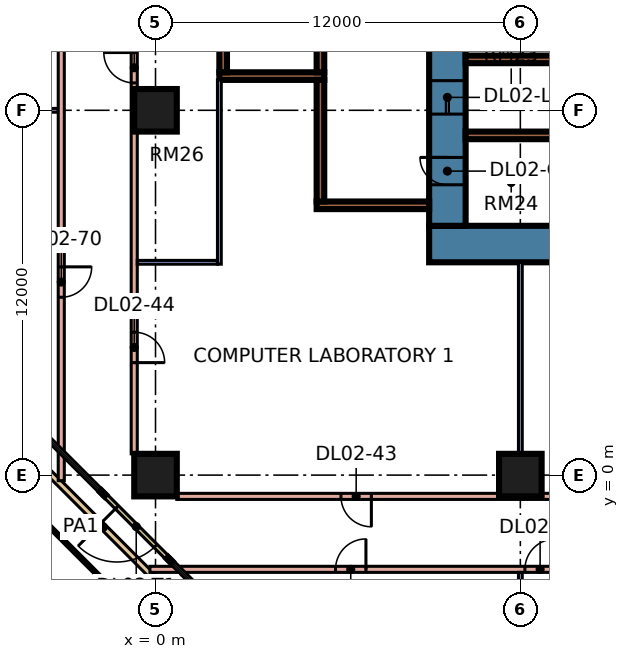
"""IFC4 building model, lengths in metres.
Left out: names, types, materials, properties, quantities, classifications, styles, units other than length and angle.
Written with IfcOpenShell. Run it as: python <this file> out.ifc"""

import sys

from ifc_helpers import new_model, si_unit, direction, frame, frame_2d, origin, origin_2d, place, context, subcontext, project, spatial, rectangle, extrude, element, fill, save


model = new_model("IFC4")
c1 = context("Model", 3, precision=1e-05, world=origin(), true_north=direction((0.0, 1.0)))
c2 = subcontext(c1, "Body", "Model", "MODEL_VIEW")
j1 = project(units=[si_unit("LENGTHUNIT", "METRE"), si_unit("PLANEANGLEUNIT", "RADIAN")], contexts=[c1])
p1 = place(None, origin())
s1 = spatial("IfcSite", under=j1, at=p1, CompositionType="ELEMENT")
p2 = place(p1, origin())
s2 = spatial("IfcBuilding", under=s1, at=p2, CompositionType="ELEMENT")
p3 = place(p2, frame((0.0, 0.0, 12.0)))
s3 = spatial("IfcBuildingStorey", under=s2, at=p3, CompositionType="ELEMENT", Elevation=12.0)
for number, where, z_axis, x_axis in (
    (1, (0.0, 0.0, 0.0), (0.0, 0.0, 1.0), (1.0, 0.0, 0.0)),
    (2, (12.0, 0.0, 0.0), (0.0, 0.0, 1.0), (1.0, 0.0, 0.0)),
    (3, (0.0, 12.0, 0.0), (0.0, 0.0, 1.0), (1.0, 0.0, 0.0)),
):
    element("IfcColumn", number, at=place(p3, frame(where, z_axis=z_axis, x_axis=x_axis)), inside=s3, PredefinedType="COLUMN", context=c2, shape_type="SweptSolid", body=[
        extrude(rectangle(XDim=1.4, YDim=1.4, at=origin_2d()), origin(), (0.0, 0.0, 1.0), 4.8),
    ])
p4 = place(p3, frame((9.0, 7.6, 0.0), z_axis=(0.0, 0.0, 1.0), x_axis=(1.0, 0.0, 0.0)))
e4 = element("IfcWall", 4, at=p4, inside=s3, PredefinedType="SHEAR", context=c2, shape_type="SweptSolid", body=[
    extrude(rectangle(XDim=25.0, YDim=1.2, at=frame_2d((12.5, 0.0))), origin(), (0.0, 0.0, 1.0), 4.8),
])
p5 = place(p3, frame((9.6, 8.2, 0.0), z_axis=(0.0, 0.0, 1.0), x_axis=(0.0, 1.0, 0.0)))
e5 = element("IfcWall", 5, at=p5, inside=s3, PredefinedType="SHEAR", context=c2, shape_type="SweptSolid", body=[
    extrude(rectangle(XDim=10.6, YDim=1.2, at=frame_2d((5.3, 0.0))), origin(), (0.0, 0.0, 1.0), 4.8),
])
p6 = place(p5, frame((3.675, 0.0, 0.0)))
e6 = element("IfcOpeningElement", 6, at=p6, cuts=e5, PredefinedType="OPENING", context=c2, shape_type="SweptSolid", body=[
    extrude(rectangle(XDim=1.1, YDim=2.2, at=frame_2d((0.55, 1.1))), frame((0.0, 0.61, 0.0), z_axis=(0.0, -1.0, 0.0), x_axis=(1.0, 0.0, 0.0)), (0.0, 0.0, 1.0), 1.22),
])
p7 = place(p5, frame((6.175, 0.0, 0.0)))
e7 = element("IfcOpeningElement", 7, at=p7, cuts=e5, PredefinedType="OPENING", context=c2, shape_type="SweptSolid", body=[
    extrude(rectangle(XDim=1.1, YDim=2.2, at=frame_2d((0.55, 1.1))), frame((0.0, 0.61, 0.0), z_axis=(0.0, -1.0, 0.0), x_axis=(1.0, 0.0, 0.0)), (0.0, 0.0, 1.0), 1.22),
])
p8 = place(p5, frame((8.8, 0.0, 0.0)))
e8 = element("IfcOpeningElement", 8, at=p8, cuts=e5, PredefinedType="OPENING", context=c2, shape_type="SweptSolid", body=[
    extrude(rectangle(XDim=1.1, YDim=2.2, at=frame_2d((0.55, 1.1))), frame((0.0, 0.61, 0.0), z_axis=(0.0, -1.0, 0.0), x_axis=(1.0, 0.0, 0.0)), (0.0, 0.0, 1.0), 1.22),
])
p9 = place(p5, frame((1.35, 0.0, 0.0)))
e9 = element("IfcOpeningElement", 9, at=p9, cuts=e5, PredefinedType="OPENING", context=c2, shape_type="SweptSolid", body=[
    extrude(rectangle(XDim=0.9, YDim=2.1, at=frame_2d((0.45, 1.05))), frame((0.0, 0.61, 0.0), z_axis=(0.0, -1.0, 0.0), x_axis=(1.0, 0.0, 0.0)), (0.0, 0.0, 1.0), 1.22),
])
for number, where, z_axis, x_axis in (
    (10, (10.2, 11.175, 0.0), (0.0, 0.0, 1.0), (1.0, 0.0, 0.0)),
    (11, (10.2, 13.675, 0.0), (0.0, 0.0, 1.0), (1.0, 0.0, 0.0)),
):
    element("IfcWall", number, at=place(p3, frame(where, z_axis=z_axis, x_axis=x_axis)), inside=s3, PredefinedType="SHEAR", context=c2, shape_type="SweptSolid", body=[
        extrude(rectangle(XDim=3.0, YDim=0.25, at=frame_2d((1.5, 0.0))), origin(), (0.0, 0.0, 1.0), 4.8),
    ])
p10 = place(p3, frame((2.1, 13.125, 0.0), z_axis=(0.0, 0.0, 1.0), x_axis=(1.0, 0.0, 0.0)))
e12 = element("IfcWall", 12, at=p10, inside=s3, PredefinedType="SHEAR", context=c2, shape_type="SweptSolid", body=[
    extrude(rectangle(XDim=3.45, YDim=0.25, at=frame_2d((1.725, 0.0))), origin(), (0.0, 0.0, 1.0), 4.8),
])
p11 = place(p3, frame((2.225, 13.25, 0.0), z_axis=(0.0, 0.0, 1.0), x_axis=(0.0, 1.0, 0.0)))
e13 = element("IfcWall", 13, at=p11, inside=s3, PredefinedType="SHEAR", context=c2, shape_type="SweptSolid", body=[
    extrude(rectangle(XDim=6.5, YDim=0.25, at=frame_2d((3.25, 0.0))), origin(), (0.0, 0.0, 1.0), 4.8),
])
p12 = place(p3, frame((5.425, 13.25, 0.0), z_axis=(0.0, 0.0, 1.0), x_axis=(0.0, 1.0, 0.0)))
e14 = element("IfcWall", 14, at=p12, inside=s3, PredefinedType="SHEAR", context=c2, shape_type="SweptSolid", body=[
    extrude(rectangle(XDim=6.5, YDim=0.25, at=frame_2d((3.25, 0.0))), origin(), (0.0, 0.0, 1.0), 4.8),
])
p13 = place(p12, frame((5.25, 0.0, 0.0)))
e15 = element("IfcOpeningElement", 15, at=p13, cuts=e14, PredefinedType="OPENING", context=c2, shape_type="SweptSolid", body=[
    extrude(rectangle(XDim=1.1, YDim=2.2, at=frame_2d((0.55, 1.1))), frame((0.0, 0.135, 0.0), z_axis=(0.0, -1.0, 0.0), x_axis=(1.0, 0.0, 0.0)), (0.0, 0.0, 1.0), 0.27),
])
p14 = place(p3, frame((5.3, 8.875, 0.0), z_axis=(0.0, 0.0, 1.0), x_axis=(1.0, 0.0, 0.0)))
e16 = element("IfcWall", 16, at=p14, inside=s3, PredefinedType="SHEAR", context=c2, shape_type="SweptSolid", body=[
    extrude(rectangle(XDim=3.7, YDim=0.25, at=frame_2d((1.85, 0.0))), origin(), (0.0, 0.0, 1.0), 4.8),
])
p15 = place(p3, frame((5.425, 9.0, 0.0), z_axis=(0.0, 0.0, 1.0), x_axis=(0.0, 1.0, 0.0)))
e17 = element("IfcWall", 17, at=p15, inside=s3, PredefinedType="SHEAR", context=c2, shape_type="SweptSolid", body=[
    extrude(rectangle(XDim=4.0, YDim=0.25, at=frame_2d((2.0, 0.0))), origin(), (0.0, 0.0, 1.0), 4.8),
])
p16 = place(p3, frame((-1.695, -0.634, 0.0), z_axis=(0.0, 0.0, 1.0), x_axis=(0.707106781187, -0.707106781187, 0.0)))
e18 = element("IfcWall", 18, at=p16, inside=s3, PredefinedType="SOLIDWALL", context=c2, shape_type="SweptSolid", body=[
    extrude(rectangle(XDim=3.0, YDim=0.15, at=frame_2d((1.5, 0.0))), origin(), (0.0, 0.0, 1.0), 4.4),
])
p17 = place(p16, frame((0.6, 0.0, 0.0)))
e19 = element("IfcOpeningElement", 19, at=p17, cuts=e18, PredefinedType="OPENING", context=c2, shape_type="SweptSolid", body=[
    extrude(rectangle(XDim=1.8, YDim=2.4, at=frame_2d((0.9, 1.2))), frame((0.0, 0.085, 0.0), z_axis=(0.0, -1.0, 0.0), x_axis=(1.0, 0.0, 0.0)), (0.0, 0.0, 1.0), 0.17),
])
p18 = place(p3, frame((8.275, -11.7, 0.0), z_axis=(0.0, 0.0, 1.0), x_axis=(-0.707106781187, 0.707106781187, 0.0)))
e20 = element("IfcWall", 20, at=p18, inside=s3, PredefinedType="PARAPET", context=c2, shape_type="SweptSolid", body=[
    extrude(rectangle(XDim=28.249, YDim=0.2, at=frame_2d((14.125, 0.0))), origin(), (0.0, 0.0, 1.0), 0.5),
])
p19 = place(p3, frame((-11.6, 12.0, 0.0), z_axis=(0.0, 0.0, 1.0), x_axis=(1.0, 0.0, 0.0)))
e21 = element("IfcWall", 21, at=p19, inside=s3, PredefinedType="PARTITIONING", context=c2, shape_type="SweptSolid", body=[
    extrude(rectangle(XDim=8.4, YDim=0.125, at=frame_2d((4.2, 0.0))), origin(), (0.0, 0.0, 1.0), 4.4),
])
p20 = place(p3, frame((-3.1, -0.184, 0.0), z_axis=(0.0, 0.0, 1.0), x_axis=(0.0, 1.0, 0.0)))
e22 = element("IfcWall", 22, at=p20, inside=s3, PredefinedType="PARTITIONING", context=c2, shape_type="SweptSolid", body=[
    extrude(rectangle(XDim=66.284, YDim=0.2, at=frame_2d((33.142, 0.0))), origin(), (0.0, 0.0, 1.0), 4.4),
])
p21 = place(p20, frame((6.034, 0.0, 0.0)))
e23 = element("IfcOpeningElement", 23, at=p21, cuts=e22, PredefinedType="OPENING", context=c2, shape_type="SweptSolid", body=[
    extrude(rectangle(XDim=1.0, YDim=2.1, at=frame_2d((0.5, 1.05))), frame((0.0, 0.11, 0.0), z_axis=(0.0, -1.0, 0.0), x_axis=(1.0, 0.0, 0.0)), (0.0, 0.0, 1.0), 0.22),
])
p22 = place(p20, frame((17.784, 0.0, 0.0)))
e24 = element("IfcOpeningElement", 24, at=p22, cuts=e22, PredefinedType="OPENING", context=c2, shape_type="SweptSolid", body=[
    extrude(rectangle(XDim=1.0, YDim=2.1, at=frame_2d((0.5, 1.05))), frame((0.0, 0.11, 0.0), z_axis=(0.0, -1.0, 0.0), x_axis=(1.0, 0.0, 0.0)), (0.0, 0.0, 1.0), 0.22),
])
p23 = place(p20, frame((23.034, 0.0, 0.0)))
e25 = element("IfcOpeningElement", 25, at=p23, cuts=e22, PredefinedType="OPENING", context=c2, shape_type="SweptSolid", body=[
    extrude(rectangle(XDim=1.0, YDim=2.1, at=frame_2d((0.5, 1.05))), frame((0.0, 0.11, 0.0), z_axis=(0.0, -1.0, 0.0), x_axis=(1.0, 0.0, 0.0)), (0.0, 0.0, 1.0), 0.22),
])
p24 = place(p20, frame((29.784, 0.0, 0.0)))
e26 = element("IfcOpeningElement", 26, at=p24, cuts=e22, PredefinedType="OPENING", context=c2, shape_type="SweptSolid", body=[
    extrude(rectangle(XDim=1.0, YDim=2.1, at=frame_2d((0.5, 1.05))), frame((0.0, 0.11, 0.0), z_axis=(0.0, -1.0, 0.0), x_axis=(1.0, 0.0, 0.0)), (0.0, 0.0, 1.0), 0.22),
])
p25 = place(p20, frame((35.034, 0.0, 0.0)))
e27 = element("IfcOpeningElement", 27, at=p25, cuts=e22, PredefinedType="OPENING", context=c2, shape_type="SweptSolid", body=[
    extrude(rectangle(XDim=1.0, YDim=2.1, at=frame_2d((0.5, 1.05))), frame((0.0, 0.11, 0.0), z_axis=(0.0, -1.0, 0.0), x_axis=(1.0, 0.0, 0.0)), (0.0, 0.0, 1.0), 0.22),
])
p26 = place(p20, frame((40.284, 0.0, 0.0)))
e28 = element("IfcOpeningElement", 28, at=p26, cuts=e22, PredefinedType="OPENING", context=c2, shape_type="SweptSolid", body=[
    extrude(rectangle(XDim=1.0, YDim=2.1, at=frame_2d((0.5, 1.05))), frame((0.0, 0.11, 0.0), z_axis=(0.0, -1.0, 0.0), x_axis=(1.0, 0.0, 0.0)), (0.0, 0.0, 1.0), 0.22),
])
p27 = place(p20, frame((49.284, 0.0, 0.0)))
e29 = element("IfcOpeningElement", 29, at=p27, cuts=e22, PredefinedType="OPENING", context=c2, shape_type="SweptSolid", body=[
    extrude(rectangle(XDim=1.0, YDim=2.1, at=frame_2d((0.5, 1.05))), frame((0.0, 0.11, 0.0), z_axis=(0.0, -1.0, 0.0), x_axis=(1.0, 0.0, 0.0)), (0.0, 0.0, 1.0), 0.22),
])
p28 = place(p20, frame((58.284, 0.0, 0.0)))
e30 = element("IfcOpeningElement", 30, at=p28, cuts=e22, PredefinedType="OPENING", context=c2, shape_type="SweptSolid", body=[
    extrude(rectangle(XDim=1.0, YDim=2.1, at=frame_2d((0.5, 1.05))), frame((0.0, 0.11, 0.0), z_axis=(0.0, -1.0, 0.0), x_axis=(1.0, 0.0, 0.0)), (0.0, 0.0, 1.0), 0.22),
])
p29 = place(p20, frame((64.134, 0.0, 0.0)))
e31 = element("IfcOpeningElement", 31, at=p29, cuts=e22, PredefinedType="OPENING", context=c2, shape_type="SweptSolid", body=[
    extrude(rectangle(XDim=1.0, YDim=2.1, at=frame_2d((0.5, 1.05))), frame((0.0, 0.11, 0.0), z_axis=(0.0, -1.0, 0.0), x_axis=(1.0, 0.0, 0.0)), (0.0, 0.0, 1.0), 0.22),
])
p30 = place(p3, frame((-0.7, 0.7, 0.0), z_axis=(0.0, 0.0, 1.0), x_axis=(0.0, 1.0, 0.0)))
e32 = element("IfcWall", 32, at=p30, inside=s3, PredefinedType="PARTITIONING", context=c2, shape_type="SweptSolid", body=[
    extrude(rectangle(XDim=22.3, YDim=0.2, at=frame_2d((11.15, 0.0))), origin(), (0.0, 0.0, 1.0), 4.4),
])
p31 = place(p30, frame((19.95, 0.0, 0.0)))
e33 = element("IfcOpeningElement", 33, at=p31, cuts=e32, PredefinedType="OPENING", context=c2, shape_type="SweptSolid", body=[
    extrude(rectangle(XDim=1.8, YDim=2.1, at=frame_2d((0.9, 1.05))), frame((0.0, 0.11, 0.0), z_axis=(0.0, -1.0, 0.0), x_axis=(1.0, 0.0, 0.0)), (0.0, 0.0, 1.0), 0.22),
])
p32 = place(p30, frame((12.2, 0.0, 0.0)))
e34 = element("IfcOpeningElement", 34, at=p32, cuts=e32, PredefinedType="OPENING", context=c2, shape_type="SweptSolid", body=[
    extrude(rectangle(XDim=1.0, YDim=2.1, at=frame_2d((0.5, 1.05))), frame((0.0, 0.11, 0.0), z_axis=(0.0, -1.0, 0.0), x_axis=(1.0, 0.0, 0.0)), (0.0, 0.0, 1.0), 0.22),
])
p33 = place(p30, frame((3.0, 0.0, 0.0)))
e35 = element("IfcOpeningElement", 35, at=p33, cuts=e32, PredefinedType="OPENING", context=c2, shape_type="SweptSolid", body=[
    extrude(rectangle(XDim=1.0, YDim=2.1, at=frame_2d((0.5, 1.05))), frame((0.0, 0.11, 0.0), z_axis=(0.0, -1.0, 0.0), x_axis=(1.0, 0.0, 0.0)), (0.0, 0.0, 1.0), 0.22),
])
p34 = place(p3, frame((-0.6, 7.0, 0.0), z_axis=(0.0, 0.0, 1.0), x_axis=(1.0, 0.0, 0.0)))
e36 = element("IfcWall", 36, at=p34, inside=s3, PredefinedType="PARTITIONING", context=c2, shape_type="SweptSolid", body=[
    extrude(rectangle(XDim=2.638, YDim=0.125, at=frame_2d((1.319, 0.0))), origin(), (0.0, 0.0, 1.0), 4.4),
])
p35 = place(p3, frame((-0.184, -3.1, 0.0), z_axis=(0.0, 0.0, 1.0), x_axis=(1.0, 0.0, 0.0)))
e37 = element("IfcWall", 37, at=p35, inside=s3, PredefinedType="PARTITIONING", context=c2, shape_type="SweptSolid", body=[
    extrude(rectangle(XDim=75.284, YDim=0.2, at=frame_2d((37.642, 0.0))), origin(), (0.0, 0.0, 1.0), 4.4),
])
p36 = place(p35, frame((6.105, 0.0, 0.0)))
e38 = element("IfcOpeningElement", 38, at=p36, cuts=e37, PredefinedType="OPENING", context=c2, shape_type="SweptSolid", body=[
    extrude(rectangle(XDim=1.0, YDim=2.1, at=frame_2d((0.5, 1.05))), frame((0.0, 0.11, 0.0), z_axis=(0.0, -1.0, 0.0), x_axis=(1.0, 0.0, 0.0)), (0.0, 0.0, 1.0), 0.22),
])
p37 = place(p35, frame((17.584, 0.0, 0.0)))
e39 = element("IfcOpeningElement", 39, at=p37, cuts=e37, PredefinedType="OPENING", context=c2, shape_type="SweptSolid", body=[
    extrude(rectangle(XDim=1.0, YDim=2.1, at=frame_2d((0.5, 1.05))), frame((0.0, 0.11, 0.0), z_axis=(0.0, -1.0, 0.0), x_axis=(1.0, 0.0, 0.0)), (0.0, 0.0, 1.0), 0.22),
])
p38 = place(p35, frame((12.334, 0.0, 0.0)))
e40 = element("IfcOpeningElement", 40, at=p38, cuts=e37, PredefinedType="OPENING", context=c2, shape_type="SweptSolid", body=[
    extrude(rectangle(XDim=1.0, YDim=2.1, at=frame_2d((0.5, 1.05))), frame((0.0, 0.11, 0.0), z_axis=(0.0, -1.0, 0.0), x_axis=(1.0, 0.0, 0.0)), (0.0, 0.0, 1.0), 0.22),
])
p39 = place(p35, frame((29.584, 0.0, 0.0)))
e41 = element("IfcOpeningElement", 41, at=p39, cuts=e37, PredefinedType="OPENING", context=c2, shape_type="SweptSolid", body=[
    extrude(rectangle(XDim=1.0, YDim=2.1, at=frame_2d((0.5, 1.05))), frame((0.0, 0.11, 0.0), z_axis=(0.0, -1.0, 0.0), x_axis=(1.0, 0.0, 0.0)), (0.0, 0.0, 1.0), 0.22),
])
p40 = place(p35, frame((24.334, 0.0, 0.0)))
e42 = element("IfcOpeningElement", 42, at=p40, cuts=e37, PredefinedType="OPENING", context=c2, shape_type="SweptSolid", body=[
    extrude(rectangle(XDim=1.0, YDim=2.1, at=frame_2d((0.5, 1.05))), frame((0.0, 0.11, 0.0), z_axis=(0.0, -1.0, 0.0), x_axis=(1.0, 0.0, 0.0)), (0.0, 0.0, 1.0), 0.22),
])
p41 = place(p35, frame((40.084, 0.0, 0.0)))
e43 = element("IfcOpeningElement", 43, at=p41, cuts=e37, PredefinedType="OPENING", context=c2, shape_type="SweptSolid", body=[
    extrude(rectangle(XDim=1.0, YDim=2.1, at=frame_2d((0.5, 1.05))), frame((0.0, 0.11, 0.0), z_axis=(0.0, -1.0, 0.0), x_axis=(1.0, 0.0, 0.0)), (0.0, 0.0, 1.0), 0.22),
])
p42 = place(p35, frame((49.084, 0.0, 0.0)))
e44 = element("IfcOpeningElement", 44, at=p42, cuts=e37, PredefinedType="OPENING", context=c2, shape_type="SweptSolid", body=[
    extrude(rectangle(XDim=1.0, YDim=2.1, at=frame_2d((0.5, 1.05))), frame((0.0, 0.11, 0.0), z_axis=(0.0, -1.0, 0.0), x_axis=(1.0, 0.0, 0.0)), (0.0, 0.0, 1.0), 0.22),
])
p43 = place(p35, frame((58.084, 0.0, 0.0)))
e45 = element("IfcOpeningElement", 45, at=p43, cuts=e37, PredefinedType="OPENING", context=c2, shape_type="SweptSolid", body=[
    extrude(rectangle(XDim=1.0, YDim=2.1, at=frame_2d((0.5, 1.05))), frame((0.0, 0.11, 0.0), z_axis=(0.0, -1.0, 0.0), x_axis=(1.0, 0.0, 0.0)), (0.0, 0.0, 1.0), 0.22),
])
p44 = place(p35, frame((67.084, 0.0, 0.0)))
e46 = element("IfcOpeningElement", 46, at=p44, cuts=e37, PredefinedType="OPENING", context=c2, shape_type="SweptSolid", body=[
    extrude(rectangle(XDim=1.0, YDim=2.1, at=frame_2d((0.5, 1.05))), frame((0.0, 0.11, 0.0), z_axis=(0.0, -1.0, 0.0), x_axis=(1.0, 0.0, 0.0)), (0.0, 0.0, 1.0), 0.22),
])
p45 = place(p35, frame((73.334, 0.0, 0.0)))
e47 = element("IfcOpeningElement", 47, at=p45, cuts=e37, PredefinedType="OPENING", context=c2, shape_type="SweptSolid", body=[
    extrude(rectangle(XDim=1.0, YDim=2.1, at=frame_2d((0.5, 1.05))), frame((0.0, 0.11, 0.0), z_axis=(0.0, -1.0, 0.0), x_axis=(1.0, 0.0, 0.0)), (0.0, 0.0, 1.0), 0.22),
])
p46 = place(p3, frame((0.7, -0.7, 0.0), z_axis=(0.0, 0.0, 1.0), x_axis=(1.0, 0.0, 0.0)))
e48 = element("IfcWall", 48, at=p46, inside=s3, PredefinedType="PARTITIONING", context=c2, shape_type="SweptSolid", body=[
    extrude(rectangle(XDim=44.3, YDim=0.2, at=frame_2d((22.15, 0.0))), origin(), (0.0, 0.0, 1.0), 4.4),
])
p47 = place(p46, frame((39.4, 0.0, 0.0)))
e49 = element("IfcOpeningElement", 49, at=p47, cuts=e48, PredefinedType="OPENING", context=c2, shape_type="SweptSolid", body=[
    extrude(rectangle(XDim=1.0, YDim=2.1, at=frame_2d((0.5, 1.05))), frame((0.0, 0.11, 0.0), z_axis=(0.0, -1.0, 0.0), x_axis=(1.0, 0.0, 0.0)), (0.0, 0.0, 1.0), 0.22),
])
p48 = place(p46, frame((5.4, 0.0, 0.0)))
e50 = element("IfcOpeningElement", 50, at=p48, cuts=e48, PredefinedType="OPENING", context=c2, shape_type="SweptSolid", body=[
    extrude(rectangle(XDim=1.0, YDim=2.1, at=frame_2d((0.5, 1.05))), frame((0.0, 0.11, 0.0), z_axis=(0.0, -1.0, 0.0), x_axis=(1.0, 0.0, 0.0)), (0.0, 0.0, 1.0), 0.22),
])
p49 = place(p46, frame((16.9, 0.0, 0.0)))
e51 = element("IfcOpeningElement", 51, at=p49, cuts=e48, PredefinedType="OPENING", context=c2, shape_type="SweptSolid", body=[
    extrude(rectangle(XDim=1.0, YDim=2.1, at=frame_2d((0.5, 1.05))), frame((0.0, 0.11, 0.0), z_axis=(0.0, -1.0, 0.0), x_axis=(1.0, 0.0, 0.0)), (0.0, 0.0, 1.0), 0.22),
])
p50 = place(p46, frame((28.9, 0.0, 0.0)))
e52 = element("IfcOpeningElement", 52, at=p50, cuts=e48, PredefinedType="OPENING", context=c2, shape_type="SweptSolid", body=[
    extrude(rectangle(XDim=1.0, YDim=2.1, at=frame_2d((0.5, 1.05))), frame((0.0, 0.11, 0.0), z_axis=(0.0, -1.0, 0.0), x_axis=(1.0, 0.0, 0.0)), (0.0, 0.0, 1.0), 0.22),
])
p51 = place(p3, frame((2.1, 6.938, 0.0), z_axis=(0.0, 0.0, 1.0), x_axis=(0.0, 1.0, 0.0)))
e53 = element("IfcWall", 53, at=p51, inside=s3, PredefinedType="PARTITIONING", context=c2, shape_type="SweptSolid", body=[
    extrude(rectangle(XDim=6.062, YDim=0.125, at=frame_2d((3.031, 0.0))), origin(), (0.0, 0.0, 1.0), 4.4),
])
p52 = place(p3, frame((12.0, -11.6, 0.0), z_axis=(0.0, 0.0, 1.0), x_axis=(0.0, 1.0, 0.0)))
e54 = element("IfcWall", 54, at=p52, inside=s3, PredefinedType="PARTITIONING", context=c2, shape_type="SweptSolid", body=[
    extrude(rectangle(XDim=8.4, YDim=0.125, at=frame_2d((4.2, 0.0))), origin(), (0.0, 0.0, 1.0), 4.4),
])
p53 = place(p3, frame((12.0, -0.6, 0.0), z_axis=(0.0, 0.0, 1.0), x_axis=(0.0, 1.0, 0.0)))
e55 = element("IfcWall", 55, at=p53, inside=s3, PredefinedType="PARTITIONING", context=c2, shape_type="SweptSolid", body=[
    extrude(rectangle(XDim=7.6, YDim=0.125, at=frame_2d((3.8, 0.0))), origin(), (0.0, 0.0, 1.0), 4.4),
])
p54 = place(p17, frame((1.8, 0.0, 0.0), z_axis=(0.0, 0.0, 1.0), x_axis=(-1.0, 0.0, 0.0)))
e56 = element("IfcDoor", 56, at=p54, inside=s3, OperationType="DOUBLE_DOOR_SINGLE_SWING", PredefinedType="DOOR", context=c2, shape_type="SweptSolid", body=[
    extrude(rectangle(XDim=1.8, YDim=2.4, at=frame_2d((0.9, 1.2))), frame((0.0, 0.025, 0.0), z_axis=(0.0, -1.0, 0.0), x_axis=(1.0, 0.0, 0.0)), (0.0, 0.0, 1.0), 0.05),
])
fill(e19, e56)
p55 = place(p6, origin())
e57 = element("IfcDoor", 57, at=p55, inside=s3, OperationType="DOUBLE_DOOR_SLIDING", PredefinedType="DOOR", context=c2, shape_type="SweptSolid", body=[
    extrude(rectangle(XDim=1.1, YDim=2.2, at=frame_2d((0.55, 1.1))), frame((0.0, 0.025, 0.0), z_axis=(0.0, -1.0, 0.0), x_axis=(1.0, 0.0, 0.0)), (0.0, 0.0, 1.0), 0.05),
])
fill(e6, e57)
p56 = place(p9, frame((0.9, 0.0, 0.0), z_axis=(0.0, 0.0, 1.0), x_axis=(-1.0, 0.0, 0.0)))
e58 = element("IfcDoor", 58, at=p56, inside=s3, OperationType="SINGLE_SWING_RIGHT", PredefinedType="DOOR", context=c2, shape_type="SweptSolid", body=[
    extrude(rectangle(XDim=0.9, YDim=2.1, at=frame_2d((0.45, 1.05))), frame((0.0, 0.025, 0.0), z_axis=(0.0, -1.0, 0.0), x_axis=(1.0, 0.0, 0.0)), (0.0, 0.0, 1.0), 0.05),
])
fill(e9, e58)
p57 = place(p32, frame((1.0, 0.0, 0.0), z_axis=(0.0, 0.0, 1.0), x_axis=(-1.0, 0.0, 0.0)))
e59 = element("IfcDoor", 59, at=p57, inside=s3, OperationType="SINGLE_SWING_RIGHT", PredefinedType="DOOR", context=c2, shape_type="SweptSolid", body=[
    extrude(rectangle(XDim=1.0, YDim=2.1, at=frame_2d((0.5, 1.05))), frame((0.0, 0.025, 0.0), z_axis=(0.0, -1.0, 0.0), x_axis=(1.0, 0.0, 0.0)), (0.0, 0.0, 1.0), 0.05),
])
fill(e34, e59)
p58 = place(p48, origin())
e60 = element("IfcDoor", 60, at=p58, inside=s3, OperationType="SINGLE_SWING_RIGHT", PredefinedType="DOOR", context=c2, shape_type="SweptSolid", body=[
    extrude(rectangle(XDim=1.0, YDim=2.1, at=frame_2d((0.5, 1.05))), frame((0.0, 0.025, 0.0), z_axis=(0.0, -1.0, 0.0), x_axis=(1.0, 0.0, 0.0)), (0.0, 0.0, 1.0), 0.05),
])
fill(e50, e60)
p59 = place(p33, frame((1.0, 0.0, 0.0), z_axis=(0.0, 0.0, 1.0), x_axis=(-1.0, 0.0, 0.0)))
e61 = element("IfcDoor", 61, at=p59, inside=s3, OperationType="SINGLE_SWING_LEFT", PredefinedType="DOOR", context=c2, shape_type="SweptSolid", body=[
    extrude(rectangle(XDim=1.0, YDim=2.1, at=frame_2d((0.5, 1.05))), frame((0.0, 0.025, 0.0), z_axis=(0.0, -1.0, 0.0), x_axis=(1.0, 0.0, 0.0)), (0.0, 0.0, 1.0), 0.05),
])
fill(e35, e61)
p60 = place(p36, frame((1.0, 0.0, 0.0), z_axis=(0.0, 0.0, 1.0), x_axis=(-1.0, 0.0, 0.0)))
e62 = element("IfcDoor", 62, at=p60, inside=s3, OperationType="SINGLE_SWING_RIGHT", PredefinedType="DOOR", context=c2, shape_type="SweptSolid", body=[
    extrude(rectangle(XDim=1.0, YDim=2.1, at=frame_2d((0.5, 1.05))), frame((0.0, 0.025, 0.0), z_axis=(0.0, -1.0, 0.0), x_axis=(1.0, 0.0, 0.0)), (0.0, 0.0, 1.0), 0.05),
])
fill(e38, e62)
p61 = place(p38, frame((1.0, 0.0, 0.0), z_axis=(0.0, 0.0, 1.0), x_axis=(-1.0, 0.0, 0.0)))
e63 = element("IfcDoor", 63, at=p61, inside=s3, OperationType="SINGLE_SWING_RIGHT", PredefinedType="DOOR", context=c2, shape_type="SweptSolid", body=[
    extrude(rectangle(XDim=1.0, YDim=2.1, at=frame_2d((0.5, 1.05))), frame((0.0, 0.025, 0.0), z_axis=(0.0, -1.0, 0.0), x_axis=(1.0, 0.0, 0.0)), (0.0, 0.0, 1.0), 0.05),
])
fill(e40, e63)
p62 = place(p21, origin())
e64 = element("IfcDoor", 64, at=p62, inside=s3, OperationType="SINGLE_SWING_RIGHT", PredefinedType="DOOR", context=c2, shape_type="SweptSolid", body=[
    extrude(rectangle(XDim=1.0, YDim=2.1, at=frame_2d((0.5, 1.05))), frame((0.0, 0.025, 0.0), z_axis=(0.0, -1.0, 0.0), x_axis=(1.0, 0.0, 0.0)), (0.0, 0.0, 1.0), 0.05),
])
fill(e23, e64)
save(model, sys.argv[1])
